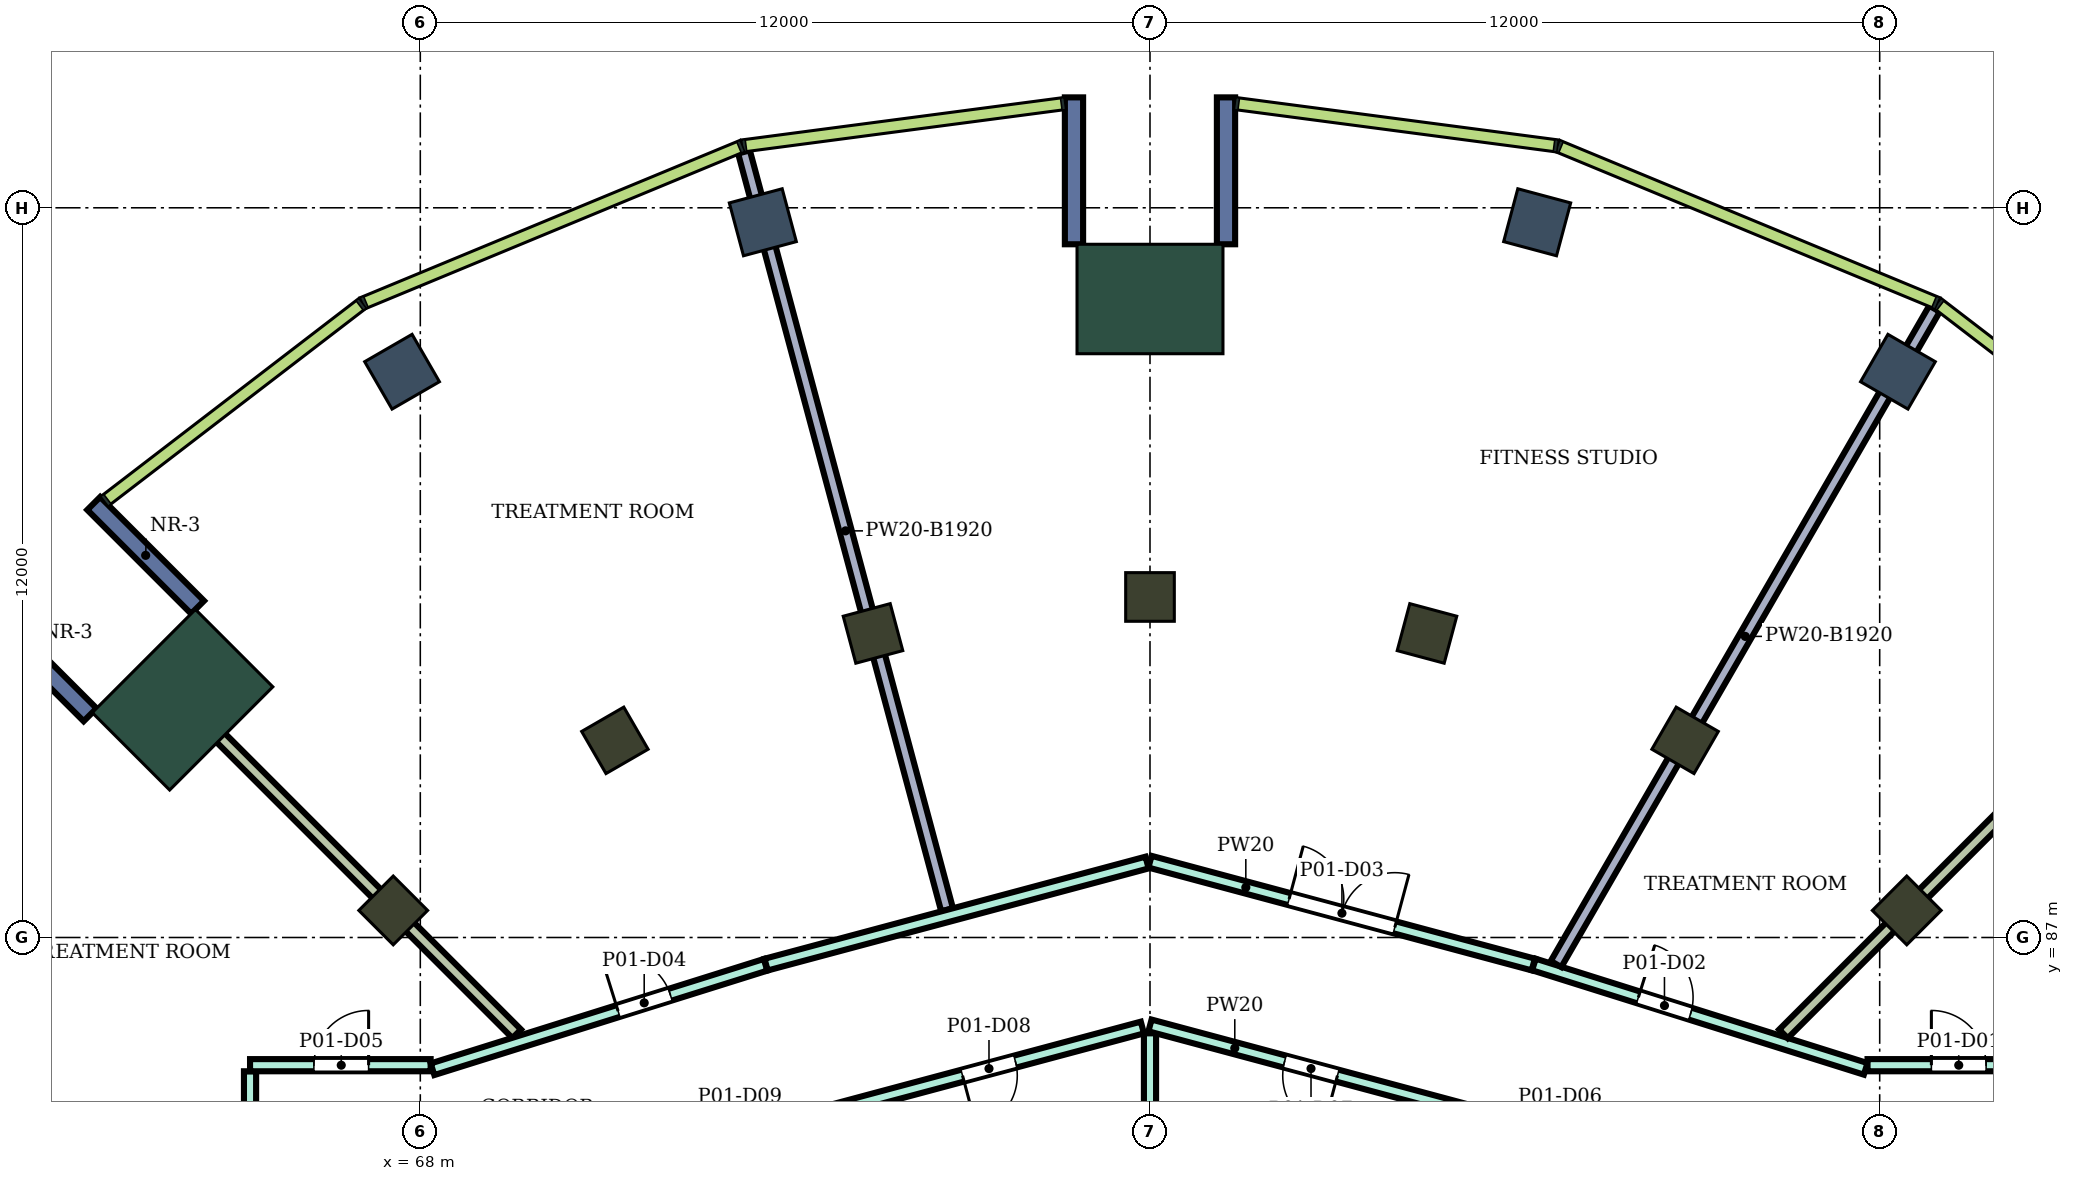
"""IFC4 building model, lengths in metres.
Left out: names, types, materials, properties, quantities, classifications, styles, units other than length and angle.
Written with IfcOpenShell. Run it as: python <this file> out.ifc"""

import sys

from ifc_helpers import new_model, si_unit, direction, frame, frame_2d, origin, origin_2d, place, context, subcontext, project, spatial, rectangle, extrude, element, fill, save


model = new_model("IFC4")
c1 = context("Model", 3, precision=1e-05, world=origin(), true_north=direction((0.0, 1.0)))
c2 = subcontext(c1, "Body", "Model", "MODEL_VIEW")
j1 = project(units=[si_unit("LENGTHUNIT", "METRE"), si_unit("PLANEANGLEUNIT", "RADIAN")], contexts=[c1])
p1 = place(None, origin())
s1 = spatial("IfcSite", under=j1, at=p1, CompositionType="ELEMENT")
p2 = place(p1, origin())
s2 = spatial("IfcBuilding", under=s1, at=p2, CompositionType="ELEMENT")
p3 = place(p2, frame((0.0, 0.0, 270.9)))
s3 = spatial("IfcBuildingStorey", under=s2, at=p3, CompositionType="ELEMENT", Elevation=270.9)
for number, where, z_axis, x_axis in (
    (1, (92.3, 96.304, 0.0), (0.0, 0.0, 1.0), (0.5, 0.866, 0.0)),
    (2, (86.367, 98.762, 0.0), (0.0, 0.0, 1.0), (0.259, 0.966, 0.0)),
    (3, (73.633, 98.762, 0.0), (0.0, 0.0, 1.0), (-0.259, 0.966, 0.0)),
    (4, (67.7, 96.304, 0.0), (0.0, 0.0, 1.0), (-0.5, 0.866, 0.0)),
):
    element("IfcColumn", number, at=place(p3, frame(where, z_axis=z_axis, x_axis=x_axis)), inside=s3, PredefinedType="COLUMN", context=c2, shape_type="SweptSolid", body=[
        extrude(rectangle(XDim=0.9, YDim=0.9, at=origin_2d()), origin(), (0.0, 0.0, 1.0), 4.8),
    ])
for number, where, z_axis, x_axis in (
    (5, (92.445, 87.445, 0.0), (0.0, 0.0, 1.0), (0.707, 0.707, 0.0)),
    (6, (88.8, 90.242, 0.0), (0.0, 0.0, 1.0), (0.5, 0.866, 0.0)),
    (7, (84.555, 92.0, 0.0), (0.0, 0.0, 1.0), (0.259, 0.966, 0.0)),
    (8, (80.0, 92.6, 0.0), (0.0, 0.0, 1.0), (0.0, 1.0, 0.0)),
    (9, (75.445, 92.0, 0.0), (0.0, 0.0, 1.0), (-0.259, 0.966, 0.0)),
    (10, (71.2, 90.242, 0.0), (0.0, 0.0, 1.0), (-0.5, 0.866, 0.0)),
    (11, (67.555, 87.445, 0.0), (0.0, 0.0, 1.0), (-0.707, 0.707, 0.0)),
):
    element("IfcColumn", number, at=place(p3, frame(where, z_axis=z_axis, x_axis=x_axis)), inside=s3, PredefinedType="COLUMN", context=c2, shape_type="SweptSolid", body=[
        extrude(rectangle(XDim=0.8, YDim=0.8, at=origin_2d()), origin(), (0.0, 0.0, 1.0), 4.8),
    ])
for number, where, z_axis, x_axis in (
    (12, (80.0, 97.5, 0.0), (0.0, 0.0, 1.0), (0.0, 1.0, 0.0)),
    (13, (64.09, 90.91, 0.0), (0.0, 0.0, 1.0), (-0.707, 0.707, 0.0)),
):
    element("IfcColumn", number, at=place(p3, frame(where, z_axis=z_axis, x_axis=x_axis)), inside=s3, PredefinedType="COLUMN", context=c2, shape_type="SweptSolid", body=[
        extrude(rectangle(XDim=1.8, YDim=2.4, at=origin_2d()), origin(), (0.0, 0.0, 1.0), 4.8),
    ])
for number, where, z_axis, x_axis in (
    (14, (81.25, 98.4, 0.0), (0.0, 0.0, 1.0), (0.0, 1.0, 0.0)),
    (15, (78.75, 98.4, 0.0), (0.0, 0.0, 1.0), (0.0, 1.0, 0.0)),
    (16, (64.338, 92.43, 0.0), (0.0, 0.0, 1.0), (-0.707, 0.707, 0.0)),
    (17, (62.57, 90.662, 0.0), (0.0, 0.0, 1.0), (-0.707, 0.707, 0.0)),
):
    element("IfcWall", number, at=place(p3, frame(where, z_axis=z_axis, x_axis=x_axis)), inside=s3, PredefinedType="NOTDEFINED", context=c2, shape_type="SweptSolid", body=[
        extrude(rectangle(XDim=2.416, YDim=0.3, at=frame_2d((1.208, 0.0))), origin(), (0.0, 0.0, 1.0), 4.8),
    ])
p4 = place(p3, frame((63.597, 91.406, 0.0), z_axis=(0.0, 0.0, 1.0), x_axis=(0.707034710536, -0.707178844492, 0.0)))
e18 = element("IfcWall", 18, at=p4, inside=s3, PredefinedType="PARTITIONING", context=c2, shape_type="SweptSolid", body=[
    extrude(rectangle(XDim=8.469, YDim=0.2, at=frame_2d((4.235, 0.0))), origin(), (0.0, 0.0, 1.0), 3.08),
])
p5 = place(p3, frame((65.2, 83.401, 0.0), z_axis=(0.0, 0.0, 1.0), x_axis=(0.0, 1.0, 0.0)))
e19 = element("IfcWall", 19, at=p5, inside=s3, PredefinedType="PARTITIONING", context=c2, shape_type="SweptSolid", body=[
    extrude(rectangle(XDim=1.399, YDim=0.2, at=frame_2d((0.7, 0.0))), origin(), (0.0, 0.0, 1.0), 4.35),
])
p6 = place(p3, frame((65.2, 84.9, 0.0), z_axis=(0.0, 0.0, 1.0), x_axis=(1.0, 0.0, 0.0)))
e20 = element("IfcWall", 20, at=p6, inside=s3, PredefinedType="PARTITIONING", context=c2, shape_type="SweptSolid", body=[
    extrude(rectangle(XDim=2.97, YDim=0.2, at=frame_2d((1.485, 0.0))), origin(), (0.0, 0.0, 1.0), 4.35),
])
p7 = place(p6, frame((1.05, 0.0, 0.0)))
e21 = element("IfcOpeningElement", 21, at=p7, cuts=e20, PredefinedType="OPENING", context=c2, shape_type="SweptSolid", body=[
    extrude(rectangle(XDim=0.9, YDim=2.1, at=frame_2d((0.45, 1.05))), frame((0.0, 0.11, 0.0), z_axis=(0.0, -1.0, 0.0), x_axis=(1.0, 0.0, 0.0)), (0.0, 0.0, 1.0), 0.22),
])
p8 = place(p3, frame((68.201, 84.833, 0.0), z_axis=(0.0, 0.0, 1.0), x_axis=(0.95420102455, 0.299166182492, 0.0)))
e22 = element("IfcWall", 22, at=p8, inside=s3, PredefinedType="PARTITIONING", context=c2, shape_type="SweptSolid", body=[
    extrude(rectangle(XDim=5.74, YDim=0.2, at=frame_2d((2.87, 0.0))), origin(), (0.0, 0.0, 1.0), 4.35),
])
p9 = place(p8, frame((3.198, 0.0, 0.0)))
e23 = element("IfcOpeningElement", 23, at=p9, cuts=e22, PredefinedType="OPENING", context=c2, shape_type="SweptSolid", body=[
    extrude(rectangle(XDim=0.9, YDim=2.1, at=frame_2d((0.45, 1.05))), frame((0.0, 0.11, 0.0), z_axis=(0.0, -1.0, 0.0), x_axis=(1.0, 0.0, 0.0)), (0.0, 0.0, 1.0), 0.22),
])
p10 = place(p3, frame((73.323, 99.918, 0.0), z_axis=(0.0, 0.0, 1.0), x_axis=(0.2588719653, -0.965911644811, 0.0)))
e24 = element("IfcWall", 24, at=p10, inside=s3, PredefinedType="PARTITIONING", context=c2, shape_type="SweptSolid", body=[
    extrude(rectangle(XDim=12.903, YDim=0.2, at=frame_2d((6.451, 0.0))), origin(), (0.0, 0.0, 1.0), 2.88),
])
p11 = place(p3, frame((73.687, 86.554, 0.0), z_axis=(0.0, 0.0, 1.0), x_axis=(0.965933770452, 0.258789395263, 0.0)))
e25 = element("IfcWall", 25, at=p11, inside=s3, PredefinedType="PARTITIONING", context=c2, shape_type="SweptSolid", body=[
    extrude(rectangle(XDim=6.486, YDim=0.2, at=frame_2d((3.243, 0.0))), origin(), (0.0, 0.0, 1.0), 4.35),
])
p12 = place(p3, frame((74.413, 84.057, 0.0), z_axis=(0.0, 0.0, 1.0), x_axis=(0.965972135939, 0.258646153246, 0.0)))
e26 = element("IfcWall", 26, at=p12, inside=s3, PredefinedType="PARTITIONING", context=c2, shape_type="SweptSolid", body=[
    extrude(rectangle(XDim=5.654, YDim=0.2, at=frame_2d((2.827, 0.0))), origin(), (0.0, 0.0, 1.0), 4.35),
])
p13 = place(p12, frame((2.593, 0.0, 0.0)))
e27 = element("IfcOpeningElement", 27, at=p13, cuts=e26, PredefinedType="OPENING", context=c2, shape_type="SweptSolid", body=[
    extrude(rectangle(XDim=0.9, YDim=2.1, at=frame_2d((0.45, 1.05))), frame((0.0, 0.11, 0.0), z_axis=(0.0, -1.0, 0.0), x_axis=(1.0, 0.0, 0.0)), (0.0, 0.0, 1.0), 0.22),
])
p14 = place(p3, frame((80.0, 82.699, 0.0), z_axis=(0.0, 0.0, 1.0), x_axis=(0.0, 1.0, 0.0)))
e28 = element("IfcWall", 28, at=p14, inside=s3, PredefinedType="PARTITIONING", context=c2, shape_type="SweptSolid", body=[
    extrude(rectangle(XDim=2.725, YDim=0.2, at=frame_2d((1.363, 0.0))), origin(), (0.0, 0.0, 1.0), 4.35),
])
p15 = place(p3, frame((80.0, 85.554, 0.0), z_axis=(0.0, 0.0, 1.0), x_axis=(0.965928989968, -0.258807237802, 0.0)))
e29 = element("IfcWall", 29, at=p15, inside=s3, PredefinedType="PARTITIONING", context=c2, shape_type="SweptSolid", body=[
    extrude(rectangle(XDim=5.774, YDim=0.2, at=frame_2d((2.887, 0.0))), origin(), (0.0, 0.0, 1.0), 4.35),
])
p16 = place(p15, frame((2.292, 0.0, 0.0)))
e30 = element("IfcOpeningElement", 30, at=p16, cuts=e29, PredefinedType="OPENING", context=c2, shape_type="SweptSolid", body=[
    extrude(rectangle(XDim=0.9, YDim=2.1, at=frame_2d((0.45, 1.05))), frame((0.0, 0.11, 0.0), z_axis=(0.0, -1.0, 0.0), x_axis=(1.0, 0.0, 0.0)), (0.0, 0.0, 1.0), 0.22),
])
p17 = place(p3, frame((80.0, 88.246, 0.0), z_axis=(0.0, 0.0, 1.0), x_axis=(0.965856994925, -0.259075790752, 0.0)))
e31 = element("IfcWall", 31, at=p17, inside=s3, PredefinedType="PARTITIONING", context=c2, shape_type="SweptSolid", body=[
    extrude(rectangle(XDim=6.526, YDim=0.2, at=frame_2d((3.263, 0.0))), origin(), (0.0, 0.0, 1.0), 4.35),
])
p18 = place(p17, frame((2.368, 0.0, 0.0)))
e32 = element("IfcOpeningElement", 32, at=p18, cuts=e31, PredefinedType="OPENING", context=c2, shape_type="SweptSolid", body=[
    extrude(rectangle(XDim=1.8, YDim=2.1, at=frame_2d((0.9, 1.05))), frame((0.0, 0.11, 0.0), z_axis=(0.0, -1.0, 0.0), x_axis=(1.0, 0.0, 0.0)), (0.0, 0.0, 1.0), 0.22),
])
p19 = place(p3, frame((86.314, 86.556, 0.0), z_axis=(0.0, 0.0, 1.0), x_axis=(0.953912400139, -0.300085209334, 0.0)))
e33 = element("IfcWall", 33, at=p19, inside=s3, PredefinedType="PARTITIONING", context=c2, shape_type="SweptSolid", body=[
    extrude(rectangle(XDim=5.719, YDim=0.2, at=frame_2d((2.86, 0.0))), origin(), (0.0, 0.0, 1.0), 4.35),
])
p20 = place(p19, frame((1.801, 0.0, 0.0)))
e34 = element("IfcOpeningElement", 34, at=p20, cuts=e33, PredefinedType="OPENING", context=c2, shape_type="SweptSolid", body=[
    extrude(rectangle(XDim=0.9, YDim=2.1, at=frame_2d((0.45, 1.05))), frame((0.0, 0.11, 0.0), z_axis=(0.0, -1.0, 0.0), x_axis=(1.0, 0.0, 0.0)), (0.0, 0.0, 1.0), 0.22),
])
p21 = place(p3, frame((86.677, 86.563, 0.0), z_axis=(0.0, 0.0, 1.0), x_axis=(0.500143584568, 0.865942489324, 0.0)))
e35 = element("IfcWall", 35, at=p21, inside=s3, PredefinedType="PARTITIONING", context=c2, shape_type="SweptSolid", body=[
    extrude(rectangle(XDim=12.445, YDim=0.2, at=frame_2d((6.222, 0.0))), origin(), (0.0, 0.0, 1.0), 2.88),
])
p22 = place(p3, frame((90.417, 85.415, 0.0), z_axis=(0.0, 0.0, 1.0), x_axis=(0.707164431244, 0.707049126429, 0.0)))
e36 = element("IfcWall", 36, at=p22, inside=s3, PredefinedType="PARTITIONING", context=c2, shape_type="SweptSolid", body=[
    extrude(rectangle(XDim=8.469, YDim=0.2, at=frame_2d((4.235, 0.0))), origin(), (0.0, 0.0, 1.0), 3.08),
])
p23 = place(p3, frame((91.8, 84.9, 0.0), z_axis=(0.0, 0.0, 1.0), x_axis=(1.0, 0.0, 0.0)))
e37 = element("IfcWall", 37, at=p23, inside=s3, PredefinedType="PARTITIONING", context=c2, shape_type="SweptSolid", body=[
    extrude(rectangle(XDim=2.9, YDim=0.2, at=frame_2d((1.45, 0.0))), origin(), (0.0, 0.0, 1.0), 4.35),
])
p24 = place(p23, frame((1.05, 0.0, 0.0)))
e38 = element("IfcOpeningElement", 38, at=p24, cuts=e37, PredefinedType="OPENING", context=c2, shape_type="SweptSolid", body=[
    extrude(rectangle(XDim=0.9, YDim=2.1, at=frame_2d((0.45, 1.05))), frame((0.0, 0.11, 0.0), z_axis=(0.0, -1.0, 0.0), x_axis=(1.0, 0.0, 0.0)), (0.0, 0.0, 1.0), 0.22),
])
p25 = place(p24, origin())
e39 = element("IfcDoor", 39, at=p25, inside=s3, OperationType="SINGLE_SWING_LEFT", PredefinedType="DOOR", context=c2, shape_type="SweptSolid", body=[
    extrude(rectangle(XDim=0.9, YDim=2.1, at=frame_2d((0.45, 1.05))), frame((0.0, 0.025, 0.0), z_axis=(0.0, -1.0, 0.0), x_axis=(1.0, 0.0, 0.0)), (0.0, 0.0, 1.0), 0.05),
])
fill(e38, e39)
p26 = place(p20, origin())
e40 = element("IfcDoor", 40, at=p26, inside=s3, OperationType="SINGLE_SWING_LEFT", PredefinedType="DOOR", context=c2, shape_type="SweptSolid", body=[
    extrude(rectangle(XDim=0.9, YDim=2.1, at=frame_2d((0.45, 1.05))), frame((0.0, 0.025, 0.0), z_axis=(0.0, -1.0, 0.0), x_axis=(1.0, 0.0, 0.0)), (0.0, 0.0, 1.0), 0.05),
])
fill(e34, e40)
p27 = place(p18, origin())
e41 = element("IfcDoor", 41, at=p27, inside=s3, OperationType="DOUBLE_DOOR_SINGLE_SWING", PredefinedType="DOOR", context=c2, shape_type="SweptSolid", body=[
    extrude(rectangle(XDim=1.8, YDim=2.1, at=frame_2d((0.9, 1.05))), frame((0.0, 0.025, 0.0), z_axis=(0.0, -1.0, 0.0), x_axis=(1.0, 0.0, 0.0)), (0.0, 0.0, 1.0), 0.05),
])
fill(e32, e41)
p28 = place(p9, origin())
e42 = element("IfcDoor", 42, at=p28, inside=s3, OperationType="SINGLE_SWING_LEFT", PredefinedType="DOOR", context=c2, shape_type="SweptSolid", body=[
    extrude(rectangle(XDim=0.9, YDim=2.1, at=frame_2d((0.45, 1.05))), frame((0.0, 0.025, 0.0), z_axis=(0.0, -1.0, 0.0), x_axis=(1.0, 0.0, 0.0)), (0.0, 0.0, 1.0), 0.05),
])
fill(e23, e42)
p29 = place(p7, origin())
e43 = element("IfcDoor", 43, at=p29, inside=s3, OperationType="SINGLE_SWING_RIGHT", PredefinedType="DOOR", context=c2, shape_type="SweptSolid", body=[
    extrude(rectangle(XDim=0.9, YDim=2.1, at=frame_2d((0.45, 1.05))), frame((0.0, 0.025, 0.0), z_axis=(0.0, -1.0, 0.0), x_axis=(1.0, 0.0, 0.0)), (0.0, 0.0, 1.0), 0.05),
])
fill(e21, e43)
p30 = place(p16, frame((0.9, 0.0, 0.0), z_axis=(0.0, 0.0, 1.0), x_axis=(-1.0, 0.0, 0.0)))
e44 = element("IfcDoor", 44, at=p30, inside=s3, OperationType="SINGLE_SWING_LEFT", PredefinedType="DOOR", context=c2, shape_type="SweptSolid", body=[
    extrude(rectangle(XDim=0.9, YDim=2.1, at=frame_2d((0.45, 1.05))), frame((0.0, 0.025, 0.0), z_axis=(0.0, -1.0, 0.0), x_axis=(1.0, 0.0, 0.0)), (0.0, 0.0, 1.0), 0.05),
])
fill(e30, e44)
p31 = place(p13, frame((0.9, 0.0, 0.0), z_axis=(0.0, 0.0, 1.0), x_axis=(-1.0, 0.0, 0.0)))
e45 = element("IfcDoor", 45, at=p31, inside=s3, OperationType="SINGLE_SWING_RIGHT", PredefinedType="DOOR", context=c2, shape_type="SweptSolid", body=[
    extrude(rectangle(XDim=0.9, YDim=2.1, at=frame_2d((0.45, 1.05))), frame((0.0, 0.025, 0.0), z_axis=(0.0, -1.0, 0.0), x_axis=(1.0, 0.0, 0.0)), (0.0, 0.0, 1.0), 0.05),
])
fill(e27, e45)
save(model, sys.argv[1])
